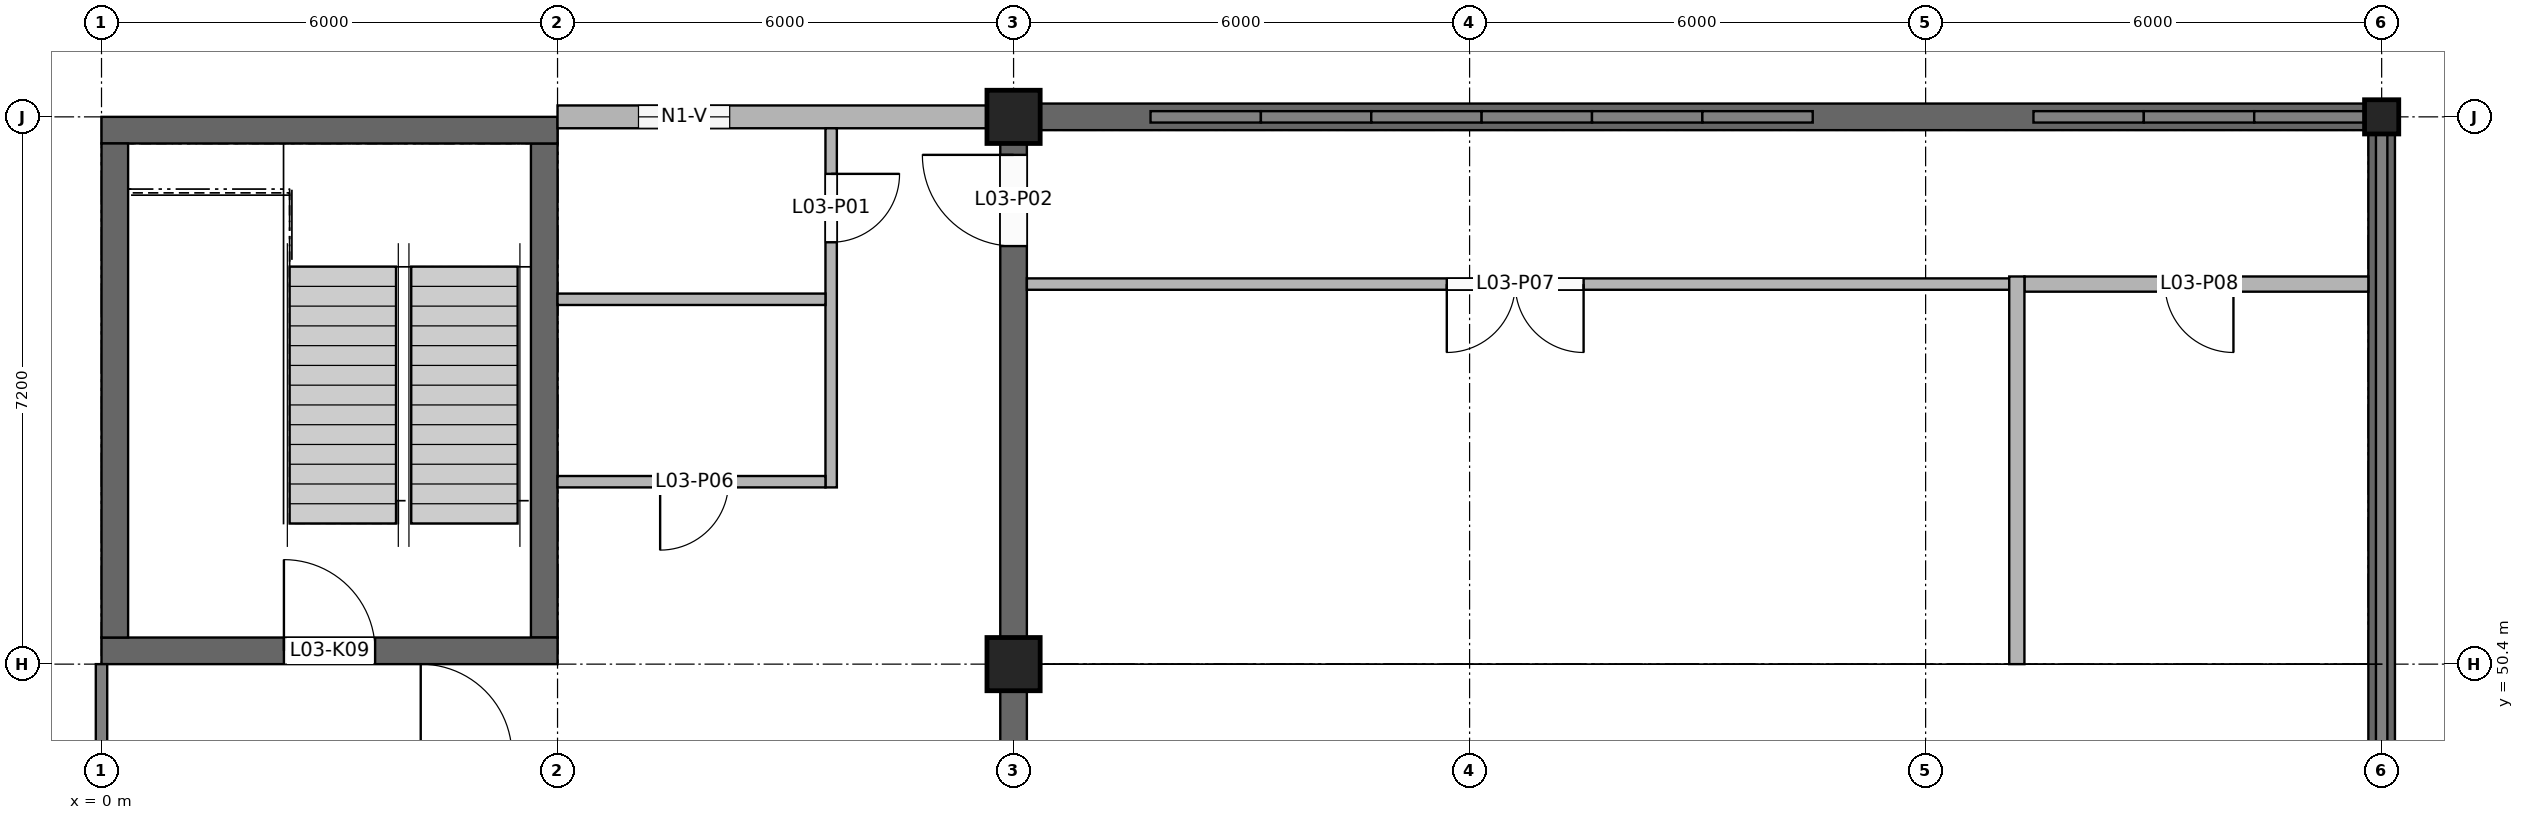
"""IFC4 building model, lengths in metres.
Left out: names, types, materials, properties, quantities, classifications, styles, units other than length and angle.
Written with IfcOpenShell. Run it as: python <this file> out.ifc"""

import sys

from ifc_helpers import new_model, si_unit, direction, frame, frame_2d, origin, origin_2d, place, context, subcontext, project, spatial, rectangle, extrude, element, fill, save


model = new_model("IFC4")
c1 = context("Model", 3, precision=1e-05, world=origin(), true_north=direction((0.0, 1.0)))
c2 = subcontext(c1, "Body", "Model", "MODEL_VIEW")
j1 = project(units=[si_unit("LENGTHUNIT", "METRE"), si_unit("PLANEANGLEUNIT", "RADIAN")], contexts=[c1])
p1 = place(None, origin())
s1 = spatial("IfcSite", under=j1, at=p1, CompositionType="ELEMENT")
p2 = place(p1, origin())
s2 = spatial("IfcBuilding", under=s1, at=p2, CompositionType="ELEMENT")
p3 = place(p2, frame((0.0, 0.0, 12.6)))
s3 = spatial("IfcBuildingStorey", under=s2, at=p3, CompositionType="ELEMENT", Elevation=12.6)
p4 = place(p3, frame((0.0, 50.575, 0.0), z_axis=(0.0, 0.0, 1.0), x_axis=(1.0, 0.0, 0.0)))
e1 = element("IfcWall", 1, at=p4, inside=s3, PredefinedType="SHEAR", context=c2, shape_type="SweptSolid", body=[
    extrude(rectangle(XDim=6.0, YDim=0.35, at=frame_2d((3.0, 0.0))), origin(), (0.0, 0.0, 1.0), 4.0),
])
p5 = place(p4, frame((2.4, 0.0, 0.0)))
e2 = element("IfcOpeningElement", 2, at=p5, cuts=e1, PredefinedType="OPENING", context=c2, shape_type="SweptSolid", body=[
    extrude(rectangle(XDim=1.2, YDim=2.1, at=frame_2d((0.6, 1.05))), frame((0.0, 0.185, 0.0), z_axis=(0.0, -1.0, 0.0), x_axis=(1.0, 0.0, 0.0)), (0.0, 0.0, 1.0), 0.37),
])
p6 = place(p3, frame((0.0, 57.425, 0.0), z_axis=(0.0, 0.0, 1.0), x_axis=(1.0, 0.0, 0.0)))
e3 = element("IfcWall", 3, at=p6, inside=s3, PredefinedType="SHEAR", context=c2, shape_type="SweptSolid", body=[
    extrude(rectangle(XDim=6.0, YDim=0.35, at=frame_2d((3.0, 0.0))), origin(), (0.0, 0.0, 1.0), 4.0),
])
for number, where, z_axis, x_axis in (
    (4, (0.175, 50.75, 0.0), (0.0, 0.0, 1.0), (0.0, 1.0, 0.0)),
    (5, (5.825, 50.75, 0.0), (0.0, 0.0, 1.0), (0.0, 1.0, 0.0)),
):
    element("IfcWall", number, at=place(p3, frame(where, z_axis=z_axis, x_axis=x_axis)), inside=s3, PredefinedType="SHEAR", context=c2, shape_type="SweptSolid", body=[
        extrude(rectangle(XDim=6.5, YDim=0.35, at=frame_2d((3.25, 0.0))), origin(), (0.0, 0.0, 1.0), 4.0),
    ])
for number, where, z_axis, x_axis in (
    (6, (12.0, 50.4, 0.0), (0.0, 0.0, 1.0), (1.0, 0.0, 0.0)),
    (7, (12.0, 57.6, 0.0), (0.0, 0.0, 1.0), (1.0, 0.0, 0.0)),
):
    element("IfcColumn", number, at=place(p3, frame(where, z_axis=z_axis, x_axis=x_axis)), inside=s3, PredefinedType="COLUMN", context=c2, shape_type="SweptSolid", body=[
        extrude(rectangle(XDim=0.7, YDim=0.7, at=origin_2d()), origin(), (0.0, 0.0, 1.0), 4.0),
    ])
p7 = place(p3, frame((30.0, 35.825, 0.0), z_axis=(0.0, 0.0, 1.0), x_axis=(0.0, 1.0, 0.0)))
e8 = element("IfcWall", 8, at=p7, inside=s3, PredefinedType="SHEAR", context=c2, shape_type="SweptSolid", body=[
    extrude(rectangle(XDim=21.95, YDim=0.35, at=frame_2d((10.975, 0.0))), origin(), (0.0, 0.0, 1.0), 3.15),
])
p8 = place(p3, frame((12.0, 43.55, 0.0), z_axis=(0.0, 0.0, 1.0), x_axis=(0.0, 1.0, 0.0)))
e9 = element("IfcWall", 9, at=p8, inside=s3, PredefinedType="SHEAR", context=c2, shape_type="SweptSolid", body=[
    extrude(rectangle(XDim=6.5, YDim=0.35, at=frame_2d((3.25, 0.0))), origin(), (0.0, 0.0, 1.0), 3.1),
])
p9 = place(p3, frame((12.0, 50.75, 0.0), z_axis=(0.0, 0.0, 1.0), x_axis=(0.0, 1.0, 0.0)))
e10 = element("IfcWall", 10, at=p9, inside=s3, PredefinedType="SHEAR", context=c2, shape_type="SweptSolid", body=[
    extrude(rectangle(XDim=6.5, YDim=0.35, at=frame_2d((3.25, 0.0))), origin(), (0.0, 0.0, 1.0), 3.1),
])
p10 = place(p9, frame((5.15, 0.0, 0.0)))
e11 = element("IfcOpeningElement", 11, at=p10, cuts=e10, PredefinedType="OPENING", context=c2, shape_type="SweptSolid", body=[
    extrude(rectangle(XDim=1.2, YDim=2.1, at=frame_2d((0.6, 1.05))), frame((0.0, 0.185, 0.0), z_axis=(0.0, -1.0, 0.0), x_axis=(1.0, 0.0, 0.0)), (0.0, 0.0, 1.0), 0.37),
])
p11 = place(p3, frame((12.35, 57.6, 0.0), z_axis=(0.0, 0.0, 1.0), x_axis=(1.0, 0.0, 0.0)))
e12 = element("IfcWall", 12, at=p11, inside=s3, PredefinedType="SHEAR", context=c2, shape_type="SweptSolid", body=[
    extrude(rectangle(XDim=17.475, YDim=0.35, at=frame_2d((8.737, 0.0))), origin(), (0.0, 0.0, 1.0), 3.158),
])
p12 = place(p3, frame((30.0, 57.6, 3.15), z_axis=(0.0, 0.0, 1.0), x_axis=(1.0, 0.0, 0.0)))
e13 = element("IfcColumn", 13, at=p12, inside=s3, PredefinedType="COLUMN", context=c2, shape_type="SweptSolid", body=[
    extrude(rectangle(XDim=0.45, YDim=0.45, at=origin_2d()), origin(), (0.0, 0.0, 1.0), 0.636),
])
p13 = place(p3, frame((6.0, 57.6, 0.0), z_axis=(0.0, 0.0, 1.0), x_axis=(1.0, 0.0, 0.0)))
e14 = element("IfcWall", 14, at=p13, inside=s3, PredefinedType="SOLIDWALL", context=c2, shape_type="SweptSolid", body=[
    extrude(rectangle(XDim=5.65, YDim=0.3, at=frame_2d((2.825, 0.0))), origin(), (0.0, 0.0, 1.0), 3.2),
])
p14 = place(p13, frame((1.065, 0.0, 0.9)))
e15 = element("IfcOpeningElement", 15, at=p14, cuts=e14, PredefinedType="OPENING", context=c2, shape_type="SweptSolid", body=[
    extrude(rectangle(XDim=1.2, YDim=1.5, at=frame_2d((0.6, 0.75))), frame((0.0, 0.16, 0.0), z_axis=(0.0, -1.0, 0.0), x_axis=(1.0, 0.0, 0.0)), (0.0, 0.0, 1.0), 0.32),
])
p15 = place(p3, frame((9.6, 52.725, 0.0), z_axis=(0.0, 0.0, 1.0), x_axis=(0.0, 1.0, 0.0)))
e16 = element("IfcWall", 16, at=p15, inside=s3, PredefinedType="PARTITIONING", context=c2, shape_type="SweptSolid", body=[
    extrude(rectangle(XDim=4.725, YDim=0.15, at=frame_2d((2.362, 0.0))), origin(), (0.0, 0.0, 1.0), 3.2),
])
p16 = place(p15, frame((3.225, 0.0, 0.0)))
e17 = element("IfcOpeningElement", 17, at=p16, cuts=e16, PredefinedType="OPENING", context=c2, shape_type="SweptSolid", body=[
    extrude(rectangle(XDim=0.9, YDim=2.1, at=frame_2d((0.45, 1.05))), frame((0.0, 0.085, 0.0), z_axis=(0.0, -1.0, 0.0), x_axis=(1.0, 0.0, 0.0)), (0.0, 0.0, 1.0), 0.17),
])
p17 = place(p3, frame((25.2, 50.4, 0.0), z_axis=(0.0, 0.0, 1.0), x_axis=(0.0, 1.0, 0.0)))
e18 = element("IfcWall", 18, at=p17, inside=s3, PredefinedType="PARTITIONING", context=c2, shape_type="SweptSolid", body=[
    extrude(rectangle(XDim=5.1, YDim=0.2, at=frame_2d((2.55, 0.0))), origin(), (0.0, 0.0, 1.0), 3.15),
])
p18 = place(p3, frame((6.0, 52.8, 0.0), z_axis=(0.0, 0.0, 1.0), x_axis=(1.0, 0.0, 0.0)))
e19 = element("IfcWall", 19, at=p18, inside=s3, PredefinedType="PARTITIONING", context=c2, shape_type="SweptSolid", body=[
    extrude(rectangle(XDim=3.525, YDim=0.15, at=frame_2d((1.762, 0.0))), origin(), (0.0, 0.0, 1.0), 4.0),
])
p19 = place(p18, frame((1.35, 0.0, 0.0)))
e20 = element("IfcOpeningElement", 20, at=p19, cuts=e19, PredefinedType="OPENING", context=c2, shape_type="SweptSolid", body=[
    extrude(rectangle(XDim=0.9, YDim=2.1, at=frame_2d((0.45, 1.05))), frame((0.0, 0.085, 0.0), z_axis=(0.0, -1.0, 0.0), x_axis=(1.0, 0.0, 0.0)), (0.0, 0.0, 1.0), 0.17),
])
p20 = place(p3, frame((6.0, 55.2, 0.0), z_axis=(0.0, 0.0, 1.0), x_axis=(1.0, 0.0, 0.0)))
e21 = element("IfcWall", 21, at=p20, inside=s3, PredefinedType="PARTITIONING", context=c2, shape_type="SweptSolid", body=[
    extrude(rectangle(XDim=3.525, YDim=0.15, at=frame_2d((1.762, 0.0))), origin(), (0.0, 0.0, 1.0), 4.0),
])
p21 = place(p3, frame((12.175, 55.4, 0.0), z_axis=(0.0, 0.0, 1.0), x_axis=(1.0, 0.0, 0.0)))
e22 = element("IfcWall", 22, at=p21, inside=s3, PredefinedType="PARTITIONING", context=c2, shape_type="SweptSolid", body=[
    extrude(rectangle(XDim=12.925, YDim=0.15, at=frame_2d((6.462, 0.0))), origin(), (0.0, 0.0, 1.0), 3.1),
])
p22 = place(p21, frame((5.525, 0.0, 0.0)))
e23 = element("IfcOpeningElement", 23, at=p22, cuts=e22, PredefinedType="OPENING", context=c2, shape_type="SweptSolid", body=[
    extrude(rectangle(XDim=1.8, YDim=2.1, at=frame_2d((0.9, 1.05))), frame((0.0, 0.085, 0.0), z_axis=(0.0, -1.0, 0.0), x_axis=(1.0, 0.0, 0.0)), (0.0, 0.0, 1.0), 0.17),
])
p23 = place(p3, frame((25.3, 55.4, 0.0), z_axis=(0.0, 0.0, 1.0), x_axis=(1.0, 0.0, 0.0)))
e24 = element("IfcWall", 24, at=p23, inside=s3, PredefinedType="PARTITIONING", context=c2, shape_type="SweptSolid", body=[
    extrude(rectangle(XDim=4.525, YDim=0.2, at=frame_2d((2.262, 0.0))), origin(), (0.0, 0.0, 1.0), 3.15),
])
p24 = place(p23, frame((1.85, 0.0, 0.0)))
e25 = element("IfcOpeningElement", 25, at=p24, cuts=e24, PredefinedType="OPENING", context=c2, shape_type="SweptSolid", body=[
    extrude(rectangle(XDim=0.9, YDim=2.1, at=frame_2d((0.45, 1.05))), frame((0.0, 0.11, 0.0), z_axis=(0.0, -1.0, 0.0), x_axis=(1.0, 0.0, 0.0)), (0.0, 0.0, 1.0), 0.22),
])
p25 = place(p14, origin())
e26 = element("IfcWindow", 26, at=p25, inside=s3, PartitioningType="SINGLE_PANEL", PredefinedType="WINDOW", context=c2, shape_type="SweptSolid", body=[
    extrude(rectangle(XDim=1.2, YDim=1.5, at=frame_2d((0.6, 0.75))), frame((0.0, 0.03, 0.0), z_axis=(0.0, -1.0, 0.0), x_axis=(1.0, 0.0, 0.0)), (0.0, 0.0, 1.0), 0.06),
])
fill(e15, e26)
p26 = place(p5, origin())
e27 = element("IfcDoor", 27, at=p26, inside=s3, OperationType="SINGLE_SWING_LEFT", PredefinedType="DOOR", context=c2, shape_type="SweptSolid", body=[
    extrude(rectangle(XDim=1.2, YDim=2.1, at=frame_2d((0.6, 1.05))), frame((0.0, 0.025, 0.0), z_axis=(0.0, -1.0, 0.0), x_axis=(1.0, 0.0, 0.0)), (0.0, 0.0, 1.0), 0.05),
])
fill(e2, e27)
p27 = place(p16, frame((0.9, 0.0, 0.0), z_axis=(0.0, 0.0, 1.0), x_axis=(-1.0, 0.0, 0.0)))
e28 = element("IfcDoor", 28, at=p27, inside=s3, OperationType="SINGLE_SWING_LEFT", PredefinedType="DOOR", context=c2, shape_type="SweptSolid", body=[
    extrude(rectangle(XDim=0.9, YDim=2.1, at=frame_2d((0.45, 1.05))), frame((0.0, 0.025, 0.0), z_axis=(0.0, -1.0, 0.0), x_axis=(1.0, 0.0, 0.0)), (0.0, 0.0, 1.0), 0.05),
])
fill(e17, e28)
p28 = place(p10, origin())
e29 = element("IfcDoor", 29, at=p28, inside=s3, OperationType="SINGLE_SWING_RIGHT", PredefinedType="DOOR", context=c2, shape_type="SweptSolid", body=[
    extrude(rectangle(XDim=1.2, YDim=2.1, at=frame_2d((0.6, 1.05))), frame((0.0, 0.025, 0.0), z_axis=(0.0, -1.0, 0.0), x_axis=(1.0, 0.0, 0.0)), (0.0, 0.0, 1.0), 0.05),
])
fill(e11, e29)
p29 = place(p19, frame((0.9, 0.0, 0.0), z_axis=(0.0, 0.0, 1.0), x_axis=(-1.0, 0.0, 0.0)))
e30 = element("IfcDoor", 30, at=p29, inside=s3, OperationType="SINGLE_SWING_RIGHT", PredefinedType="DOOR", context=c2, shape_type="SweptSolid", body=[
    extrude(rectangle(XDim=0.9, YDim=2.1, at=frame_2d((0.45, 1.05))), frame((0.0, 0.025, 0.0), z_axis=(0.0, -1.0, 0.0), x_axis=(1.0, 0.0, 0.0)), (0.0, 0.0, 1.0), 0.05),
])
fill(e20, e30)
p30 = place(p22, frame((1.8, 0.0, 0.0), z_axis=(0.0, 0.0, 1.0), x_axis=(-1.0, 0.0, 0.0)))
e31 = element("IfcDoor", 31, at=p30, inside=s3, OperationType="DOUBLE_DOOR_SINGLE_SWING", PredefinedType="DOOR", context=c2, shape_type="SweptSolid", body=[
    extrude(rectangle(XDim=1.8, YDim=2.1, at=frame_2d((0.9, 1.05))), frame((0.0, 0.025, 0.0), z_axis=(0.0, -1.0, 0.0), x_axis=(1.0, 0.0, 0.0)), (0.0, 0.0, 1.0), 0.05),
])
fill(e23, e31)
p31 = place(p24, frame((0.9, 0.0, 0.0), z_axis=(0.0, 0.0, 1.0), x_axis=(-1.0, 0.0, 0.0)))
e32 = element("IfcDoor", 32, at=p31, inside=s3, OperationType="SINGLE_SWING_LEFT", PredefinedType="DOOR", context=c2, shape_type="SweptSolid", body=[
    extrude(rectangle(XDim=0.9, YDim=2.1, at=frame_2d((0.45, 1.05))), frame((0.0, 0.025, 0.0), z_axis=(0.0, -1.0, 0.0), x_axis=(1.0, 0.0, 0.0)), (0.0, 0.0, 1.0), 0.05),
])
fill(e25, e32)
save(model, sys.argv[1])
